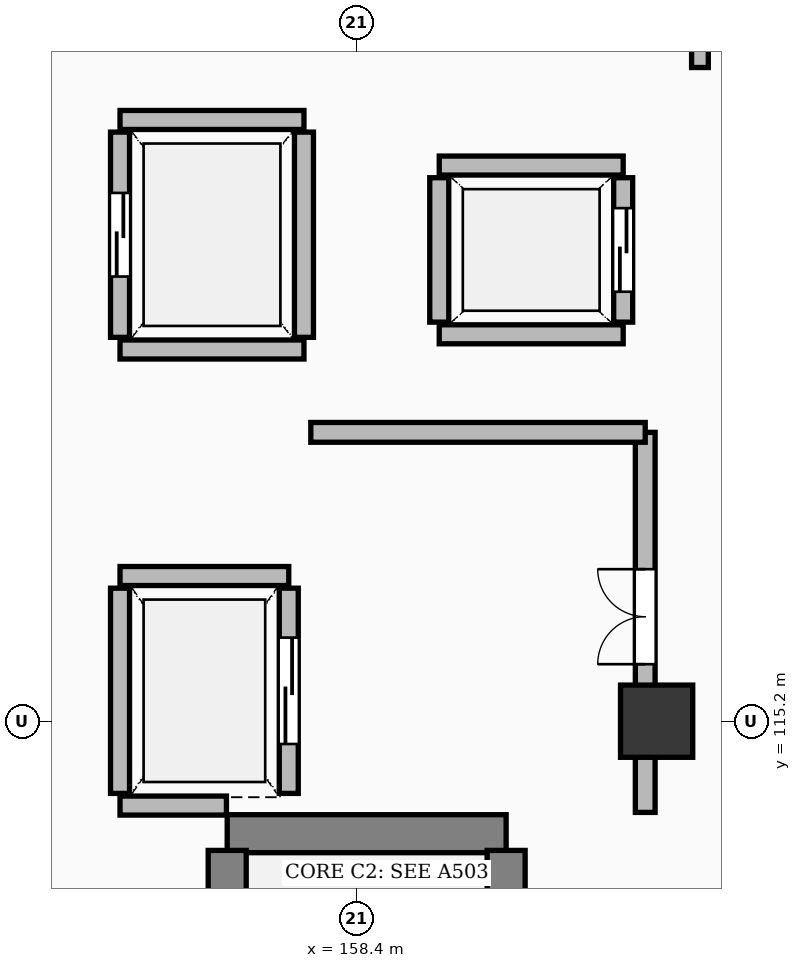
"""IFC4 building model, lengths in metres.
Left out: names, types, materials, properties, quantities, classifications, styles, units other than length and angle.
Written with IfcOpenShell. Run it as: python <this file> out.ifc"""

import sys

from ifc_helpers import new_model, si_unit, direction, frame, frame_2d, origin, origin_2d, place, context, subcontext, project, spatial, rectangle, extrude, element, fill, save


model = new_model("IFC4")
c1 = context("Model", 3, precision=1e-05, world=origin(), true_north=direction((0.0, 1.0)))
c2 = subcontext(c1, "Body", "Model", "MODEL_VIEW")
j1 = project(units=[si_unit("LENGTHUNIT", "METRE"), si_unit("PLANEANGLEUNIT", "RADIAN")], contexts=[c1])
p1 = place(None, origin())
s1 = spatial("IfcSite", under=j1, at=p1, CompositionType="ELEMENT")
p2 = place(p1, origin())
s2 = spatial("IfcBuilding", under=s1, at=p2, CompositionType="ELEMENT")
p3 = place(p2, frame((0.0, 0.0, 11.4)))
s3 = spatial("IfcBuildingStorey", under=s2, at=p3, CompositionType="ELEMENT", Elevation=11.4)
p4 = place(p3, frame((162.35, 115.2, 0.0), z_axis=(0.0, 0.0, 1.0), x_axis=(1.0, 0.0, 0.0)))
e1 = element("IfcColumn", 1, at=p4, inside=s3, PredefinedType="COLUMN", context=c2, shape_type="SweptSolid", body=[
    extrude(rectangle(XDim=0.95, YDim=0.95, at=origin_2d()), origin(), (0.0, 0.0, 1.0), 4.8),
])
p5 = place(p3, frame((156.7, 113.72, 0.0), z_axis=(0.0, 0.0, 1.0), x_axis=(1.0, 0.0, 0.0)))
e2 = element("IfcWall", 2, at=p5, inside=s3, PredefinedType="SHEAR", context=c2, shape_type="SweptSolid", body=[
    extrude(rectangle(XDim=3.67, YDim=0.5, at=frame_2d((1.835, 0.0))), origin(), (0.0, 0.0, 1.0), 4.42),
])
p6 = place(p3, frame((156.7, 103.0, 0.0), z_axis=(0.0, 0.0, 1.0), x_axis=(0.0, 1.0, 0.0)))
e3 = element("IfcWall", 3, at=p6, inside=s3, PredefinedType="SHEAR", context=c2, shape_type="SweptSolid", body=[
    extrude(rectangle(XDim=10.5, YDim=0.5, at=frame_2d((5.25, 0.0))), origin(), (0.0, 0.0, 1.0), 4.42),
])
p7 = place(p3, frame((160.37, 103.0, 0.0), z_axis=(0.0, 0.0, 1.0), x_axis=(0.0, 1.0, 0.0)))
e4 = element("IfcWall", 4, at=p7, inside=s3, PredefinedType="SHEAR", context=c2, shape_type="SweptSolid", body=[
    extrude(rectangle(XDim=10.5, YDim=0.5, at=frame_2d((5.25, 0.0))), origin(), (0.0, 0.0, 1.0), 4.42),
])
p8 = place(p7, frame((0.45, 0.0, 0.0)))
e5 = element("IfcOpeningElement", 5, at=p8, cuts=e4, PredefinedType="OPENING", context=c2, shape_type="SweptSolid", body=[
    extrude(rectangle(XDim=1.3, YDim=2.15, at=frame_2d((0.65, 1.075))), frame((0.0, 0.262, 0.0), z_axis=(0.0, -1.0, 0.0), x_axis=(1.0, 0.0, 0.0)), (0.0, 0.0, 1.0), 0.524),
])
p9 = place(p3, frame((155.29, 114.09, 0.0), z_axis=(0.0, 0.0, 1.0), x_axis=(1.0, 0.0, 0.0)))
e6 = element("IfcWall", 6, at=p9, inside=s3, PredefinedType="SOLIDWALL", context=c2, shape_type="SweptSolid", body=[
    extrude(rectangle(XDim=1.4, YDim=0.25, at=frame_2d((0.7, 0.0))), origin(), (0.0, 0.0, 1.0), 4.42),
])
p10 = place(p3, frame((155.29, 117.11, 0.0), z_axis=(0.0, 0.0, 1.0), x_axis=(1.0, 0.0, 0.0)))
e7 = element("IfcWall", 7, at=p10, inside=s3, PredefinedType="SOLIDWALL", context=c2, shape_type="SweptSolid", body=[
    extrude(rectangle(XDim=2.22, YDim=0.25, at=frame_2d((1.11, 0.0))), origin(), (0.0, 0.0, 1.0), 4.42),
])
p11 = place(p3, frame((155.29, 114.25, 0.0), z_axis=(0.0, 0.0, 1.0), x_axis=(0.0, 1.0, 0.0)))
e8 = element("IfcWall", 8, at=p11, inside=s3, PredefinedType="SOLIDWALL", context=c2, shape_type="SweptSolid", body=[
    extrude(rectangle(XDim=2.7, YDim=0.25, at=frame_2d((1.35, 0.0))), origin(), (0.0, 0.0, 1.0), 3.692),
])
p12 = place(p3, frame((157.51, 114.25, 0.0), z_axis=(0.0, 0.0, 1.0), x_axis=(0.0, 1.0, 0.0)))
e9 = element("IfcWall", 9, at=p12, inside=s3, PredefinedType="SOLIDWALL", context=c2, shape_type="SweptSolid", body=[
    extrude(rectangle(XDim=2.7, YDim=0.25, at=frame_2d((1.35, 0.0))), origin(), (0.0, 0.0, 1.0), 3.692),
])
p13 = place(p12, frame((0.65, 0.0, 0.0)))
e10 = element("IfcOpeningElement", 10, at=p13, cuts=e9, PredefinedType="OPENING", context=c2, shape_type="SweptSolid", body=[
    extrude(rectangle(XDim=1.4, YDim=2.3, at=frame_2d((0.7, 1.15))), frame((0.0, 0.137, 0.0), z_axis=(0.0, -1.0, 0.0), x_axis=(1.0, 0.0, 0.0)), (0.0, 0.0, 1.0), 0.274),
])
for number, where, z_axis, x_axis in (
    (11, (159.49, 120.29, 0.0), (0.0, 0.0, 1.0), (1.0, 0.0, 0.0)),
    (12, (159.49, 122.51, 0.0), (0.0, 0.0, 1.0), (1.0, 0.0, 0.0)),
):
    element("IfcWall", number, at=place(p3, frame(where, z_axis=z_axis, x_axis=x_axis)), inside=s3, PredefinedType="SOLIDWALL", context=c2, shape_type="SweptSolid", body=[
        extrude(rectangle(XDim=2.42, YDim=0.25, at=frame_2d((1.21, 0.0))), origin(), (0.0, 0.0, 1.0), 4.42),
    ])
p14 = place(p3, frame((159.49, 120.45, 0.0), z_axis=(0.0, 0.0, 1.0), x_axis=(0.0, 1.0, 0.0)))
e13 = element("IfcWall", 13, at=p14, inside=s3, PredefinedType="SOLIDWALL", context=c2, shape_type="SweptSolid", body=[
    extrude(rectangle(XDim=1.9, YDim=0.25, at=frame_2d((0.95, 0.0))), origin(), (0.0, 0.0, 1.0), 4.42),
])
p15 = place(p3, frame((161.91, 120.45, 0.0), z_axis=(0.0, 0.0, 1.0), x_axis=(0.0, 1.0, 0.0)))
e14 = element("IfcWall", 14, at=p15, inside=s3, PredefinedType="SOLIDWALL", context=c2, shape_type="SweptSolid", body=[
    extrude(rectangle(XDim=1.9, YDim=0.25, at=frame_2d((0.95, 0.0))), origin(), (0.0, 0.0, 1.0), 4.42),
])
p16 = place(p15, frame((0.4, 0.0, 0.0)))
e15 = element("IfcOpeningElement", 15, at=p16, cuts=e14, PredefinedType="OPENING", context=c2, shape_type="SweptSolid", body=[
    extrude(rectangle(XDim=1.1, YDim=2.2, at=frame_2d((0.55, 1.1))), frame((0.0, 0.137, 0.0), z_axis=(0.0, -1.0, 0.0), x_axis=(1.0, 0.0, 0.0)), (0.0, 0.0, 1.0), 0.274),
])
for number, where, z_axis, x_axis in (
    (16, (155.29, 120.09, 0.0), (0.0, 0.0, 1.0), (1.0, 0.0, 0.0)),
    (17, (155.29, 123.11, 0.0), (0.0, 0.0, 1.0), (1.0, 0.0, 0.0)),
):
    element("IfcWall", number, at=place(p3, frame(where, z_axis=z_axis, x_axis=x_axis)), inside=s3, PredefinedType="SOLIDWALL", context=c2, shape_type="SweptSolid", body=[
        extrude(rectangle(XDim=2.42, YDim=0.25, at=frame_2d((1.21, 0.0))), origin(), (0.0, 0.0, 1.0), 4.42),
    ])
p17 = place(p3, frame((155.29, 120.25, 0.0), z_axis=(0.0, 0.0, 1.0), x_axis=(0.0, 1.0, 0.0)))
e18 = element("IfcWall", 18, at=p17, inside=s3, PredefinedType="SOLIDWALL", context=c2, shape_type="SweptSolid", body=[
    extrude(rectangle(XDim=2.7, YDim=0.25, at=frame_2d((1.35, 0.0))), origin(), (0.0, 0.0, 1.0), 4.42),
])
p18 = place(p17, frame((0.8, 0.0, 0.0)))
e19 = element("IfcOpeningElement", 19, at=p18, cuts=e18, PredefinedType="OPENING", context=c2, shape_type="SweptSolid", body=[
    extrude(rectangle(XDim=1.1, YDim=2.2, at=frame_2d((0.55, 1.1))), frame((0.0, 0.137, 0.0), z_axis=(0.0, -1.0, 0.0), x_axis=(1.0, 0.0, 0.0)), (0.0, 0.0, 1.0), 0.274),
])
p19 = place(p3, frame((157.71, 120.25, 0.0), z_axis=(0.0, 0.0, 1.0), x_axis=(0.0, 1.0, 0.0)))
e20 = element("IfcWall", 20, at=p19, inside=s3, PredefinedType="SOLIDWALL", context=c2, shape_type="SweptSolid", body=[
    extrude(rectangle(XDim=2.7, YDim=0.25, at=frame_2d((1.35, 0.0))), origin(), (0.0, 0.0, 1.0), 4.42),
])
p20 = place(p3, frame((162.2, 114.0, 0.0), z_axis=(0.0, 0.0, 1.0), x_axis=(0.0, 1.0, 0.0)))
e21 = element("IfcWall", 21, at=p20, inside=s3, PredefinedType="SOLIDWALL", context=c2, shape_type="SweptSolid", body=[
    extrude(rectangle(XDim=5.0, YDim=0.26, at=frame_2d((2.5, 0.0))), origin(), (0.0, 0.0, 1.0), 3.692),
])
p21 = place(p20, frame((1.95, 0.0, 0.0)))
e22 = element("IfcOpeningElement", 22, at=p21, cuts=e21, PredefinedType="OPENING", context=c2, shape_type="SweptSolid", body=[
    extrude(rectangle(XDim=1.25, YDim=2.15, at=frame_2d((0.625, 1.075))), frame((0.0, 0.142, 0.0), z_axis=(0.0, -1.0, 0.0), x_axis=(1.0, 0.0, 0.0)), (0.0, 0.0, 1.0), 0.284),
])
p22 = place(p3, frame((157.8, 119.0, 0.0), z_axis=(0.0, 0.0, 1.0), x_axis=(1.0, 0.0, 0.0)))
e23 = element("IfcWall", 23, at=p22, inside=s3, PredefinedType="SOLIDWALL", context=c2, shape_type="SweptSolid", body=[
    extrude(rectangle(XDim=4.4, YDim=0.26, at=frame_2d((2.2, 0.0))), origin(), (0.0, 0.0, 1.0), 3.692),
])
p23 = place(p3, frame((162.92, 123.8, 0.0), z_axis=(0.0, 0.0, 1.0), x_axis=(0.0, 1.0, 0.0)))
e24 = element("IfcWall", 24, at=p23, inside=s3, PredefinedType="PARTITIONING", context=c2, shape_type="SweptSolid", body=[
    extrude(rectangle(XDim=1.85, YDim=0.22, at=frame_2d((0.925, 0.0))), origin(), (0.0, 0.0, 1.0), 3.662),
])
p24 = place(p13, origin())
e25 = element("IfcDoor", 25, at=p24, inside=s3, OperationType="SLIDING_TO_LEFT", PredefinedType="DOOR", context=c2, shape_type="SweptSolid", body=[
    extrude(rectangle(XDim=1.4, YDim=2.3, at=frame_2d((0.7, 1.15))), frame((0.0, 0.025, 0.0), z_axis=(0.0, -1.0, 0.0), x_axis=(1.0, 0.0, 0.0)), (0.0, 0.0, 1.0), 0.05),
])
fill(e10, e25)
p25 = place(p16, origin())
e26 = element("IfcDoor", 26, at=p25, inside=s3, OperationType="SLIDING_TO_LEFT", PredefinedType="DOOR", context=c2, shape_type="SweptSolid", body=[
    extrude(rectangle(XDim=1.1, YDim=2.2, at=frame_2d((0.55, 1.1))), frame((0.0, 0.025, 0.0), z_axis=(0.0, -1.0, 0.0), x_axis=(1.0, 0.0, 0.0)), (0.0, 0.0, 1.0), 0.05),
])
fill(e15, e26)
p26 = place(p18, origin())
e27 = element("IfcDoor", 27, at=p26, inside=s3, OperationType="SLIDING_TO_LEFT", PredefinedType="DOOR", context=c2, shape_type="SweptSolid", body=[
    extrude(rectangle(XDim=1.1, YDim=2.2, at=frame_2d((0.55, 1.1))), frame((0.0, 0.025, 0.0), z_axis=(0.0, -1.0, 0.0), x_axis=(1.0, 0.0, 0.0)), (0.0, 0.0, 1.0), 0.05),
])
fill(e19, e27)
p27 = place(p21, origin())
e28 = element("IfcDoor", 28, at=p27, inside=s3, OperationType="DOUBLE_DOOR_SINGLE_SWING", PredefinedType="DOOR", context=c2, shape_type="SweptSolid", body=[
    extrude(rectangle(XDim=1.25, YDim=2.15, at=frame_2d((0.625, 1.075))), frame((0.0, 0.025, 0.0), z_axis=(0.0, -1.0, 0.0), x_axis=(1.0, 0.0, 0.0)), (0.0, 0.0, 1.0), 0.05),
])
fill(e22, e28)
save(model, sys.argv[1])
